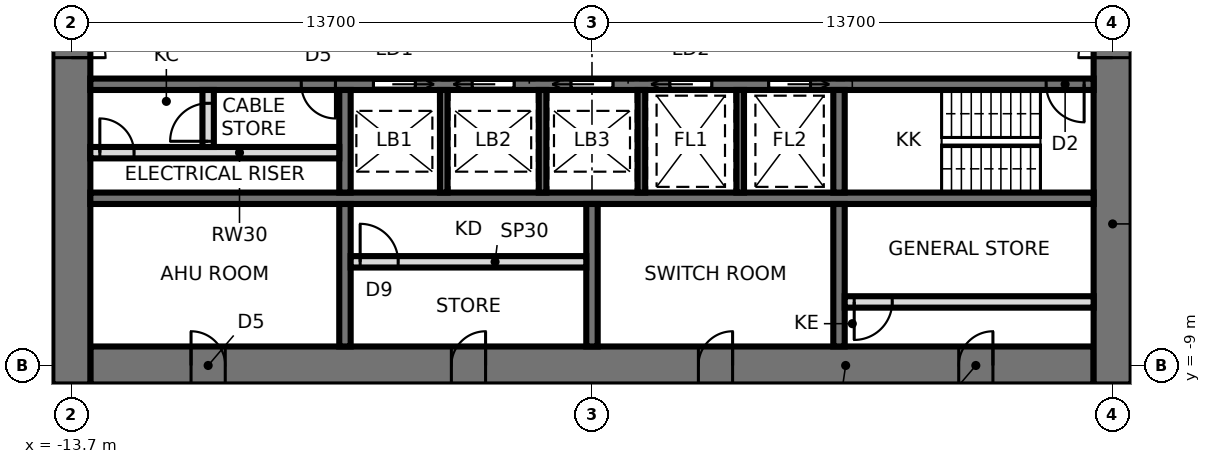
"""IFC4 building model, lengths in metres.
Left out: names, types, materials, properties, quantities, classifications, styles, units other than length and angle.
Written with IfcOpenShell. Run it as: python <this file> out.ifc"""

import sys

from ifc_helpers import new_model, si_unit, direction, frame, frame_2d, origin, place, context, subcontext, project, spatial, rectangle, extrude, element, fill, save


model = new_model("IFC4")
c1 = context("Model", 3, precision=1e-05, world=origin(), true_north=direction((0.0, 1.0)))
c2 = subcontext(c1, "Body", "Model", "MODEL_VIEW")
j1 = project(units=[si_unit("LENGTHUNIT", "METRE"), si_unit("PLANEANGLEUNIT", "RADIAN")], contexts=[c1])
p1 = place(None, origin())
s1 = spatial("IfcSite", under=j1, at=p1, CompositionType="ELEMENT")
p2 = place(p1, origin())
s2 = spatial("IfcBuilding", under=s1, at=p2, CompositionType="ELEMENT")
p3 = place(p2, frame((0.0, 0.0, 115.8)))
s3 = spatial("IfcBuildingStorey", under=s2, at=p3, CompositionType="ELEMENT", Elevation=115.8)
p4 = place(p3, frame((-13.2, -9.0, 0.0), z_axis=(0.0, 0.0, 1.0), x_axis=(1.0, 0.0, 0.0)))
e1 = element("IfcWall", 1, at=p4, inside=s3, PredefinedType="SHEAR", context=c2, shape_type="SweptSolid", body=[
    extrude(rectangle(XDim=26.4, YDim=1.0, at=frame_2d((13.2, 0.0))), origin(), (0.0, 0.0, 1.0), 3.9),
])
p5 = place(p4, frame((2.65, 0.0, 0.0)))
e2 = element("IfcOpeningElement", 2, at=p5, cuts=e1, PredefinedType="OPENING", context=c2, shape_type="SweptSolid", body=[
    extrude(rectangle(XDim=0.9, YDim=2.1, at=frame_2d((0.45, 1.05))), frame((0.0, 0.51, 0.0), z_axis=(0.0, -1.0, 0.0), x_axis=(1.0, 0.0, 0.0)), (0.0, 0.0, 1.0), 1.02),
])
p6 = place(p4, frame((9.5, 0.0, 0.0)))
e3 = element("IfcOpeningElement", 3, at=p6, cuts=e1, PredefinedType="OPENING", context=c2, shape_type="SweptSolid", body=[
    extrude(rectangle(XDim=0.9, YDim=2.1, at=frame_2d((0.45, 1.05))), frame((0.0, 0.51, 0.0), z_axis=(0.0, -1.0, 0.0), x_axis=(1.0, 0.0, 0.0)), (0.0, 0.0, 1.0), 1.02),
])
p7 = place(p4, frame((16.0, 0.0, 0.0)))
e4 = element("IfcOpeningElement", 4, at=p7, cuts=e1, PredefinedType="OPENING", context=c2, shape_type="SweptSolid", body=[
    extrude(rectangle(XDim=0.9, YDim=2.1, at=frame_2d((0.45, 1.05))), frame((0.0, 0.51, 0.0), z_axis=(0.0, -1.0, 0.0), x_axis=(1.0, 0.0, 0.0)), (0.0, 0.0, 1.0), 1.02),
])
p8 = place(p4, frame((22.85, 0.0, 0.0)))
e5 = element("IfcOpeningElement", 5, at=p8, cuts=e1, PredefinedType="OPENING", context=c2, shape_type="SweptSolid", body=[
    extrude(rectangle(XDim=0.9, YDim=2.1, at=frame_2d((0.45, 1.05))), frame((0.0, 0.51, 0.0), z_axis=(0.0, -1.0, 0.0), x_axis=(1.0, 0.0, 0.0)), (0.0, 0.0, 1.0), 1.02),
])
p9 = place(p3, frame((13.7, -9.5, 0.0), z_axis=(0.0, 0.0, 1.0), x_axis=(0.0, 1.0, 0.0)))
e6 = element("IfcWall", 6, at=p9, inside=s3, PredefinedType="SHEAR", context=c2, shape_type="SweptSolid", body=[
    extrude(rectangle(XDim=19.0, YDim=1.0, at=frame_2d((9.5, 0.0))), origin(), (0.0, 0.0, 1.0), 3.9),
])
p10 = place(p9, frame((8.6, 0.0, 0.0)))
e7 = element("IfcOpeningElement", 7, at=p10, cuts=e6, PredefinedType="OPENING", context=c2, shape_type="SweptSolid", body=[
    extrude(rectangle(XDim=1.8, YDim=2.4, at=frame_2d((0.9, 1.2))), frame((0.0, 0.51, 0.0), z_axis=(0.0, -1.0, 0.0), x_axis=(1.0, 0.0, 0.0)), (0.0, 0.0, 1.0), 1.02),
])
p11 = place(p3, frame((-13.7, 9.5, 0.0), z_axis=(0.0, 0.0, 1.0), x_axis=(0.0, -1.0, 0.0)))
e8 = element("IfcWall", 8, at=p11, inside=s3, PredefinedType="SHEAR", context=c2, shape_type="SweptSolid", body=[
    extrude(rectangle(XDim=19.0, YDim=1.0, at=frame_2d((9.5, 0.0))), origin(), (0.0, 0.0, 1.0), 3.9),
])
p12 = place(p11, frame((8.6, 0.0, 0.0)))
e9 = element("IfcOpeningElement", 9, at=p12, cuts=e8, PredefinedType="OPENING", context=c2, shape_type="SweptSolid", body=[
    extrude(rectangle(XDim=1.8, YDim=2.4, at=frame_2d((0.9, 1.2))), frame((0.0, 0.51, 0.0), z_axis=(0.0, -1.0, 0.0), x_axis=(1.0, 0.0, 0.0)), (0.0, 0.0, 1.0), 1.02),
])
p13 = place(p3, frame((-13.2, -1.6, 0.0), z_axis=(0.0, 0.0, 1.0), x_axis=(1.0, 0.0, 0.0)))
e10 = element("IfcWall", 10, at=p13, inside=s3, PredefinedType="SHEAR", context=c2, shape_type="SweptSolid", body=[
    extrude(rectangle(XDim=26.4, YDim=0.3, at=frame_2d((13.2, 0.0))), origin(), (0.0, 0.0, 1.0), 3.9),
])
p14 = place(p13, frame((25.15, 0.0, 0.0)))
e11 = element("IfcOpeningElement", 11, at=p14, cuts=e10, PredefinedType="OPENING", context=c2, shape_type="SweptSolid", body=[
    extrude(rectangle(XDim=1.0, YDim=2.1, at=frame_2d((0.5, 1.05))), frame((0.0, 0.16, 0.0), z_axis=(0.0, -1.0, 0.0), x_axis=(1.0, 0.0, 0.0)), (0.0, 0.0, 1.0), 0.32),
])
p15 = place(p13, frame((7.45, 0.0, 0.0)))
e12 = element("IfcOpeningElement", 12, at=p15, cuts=e10, PredefinedType="OPENING", context=c2, shape_type="SweptSolid", body=[
    extrude(rectangle(XDim=1.1, YDim=2.3, at=frame_2d((0.55, 1.15))), frame((0.0, 0.16, 0.0), z_axis=(0.0, -1.0, 0.0), x_axis=(1.0, 0.0, 0.0)), (0.0, 0.0, 1.0), 0.32),
])
p16 = place(p13, frame((10.05, 0.0, 0.0)))
e13 = element("IfcOpeningElement", 13, at=p16, cuts=e10, PredefinedType="OPENING", context=c2, shape_type="SweptSolid", body=[
    extrude(rectangle(XDim=1.1, YDim=2.3, at=frame_2d((0.55, 1.15))), frame((0.0, 0.16, 0.0), z_axis=(0.0, -1.0, 0.0), x_axis=(1.0, 0.0, 0.0)), (0.0, 0.0, 1.0), 0.32),
])
p17 = place(p13, frame((12.65, 0.0, 0.0)))
e14 = element("IfcOpeningElement", 14, at=p17, cuts=e10, PredefinedType="OPENING", context=c2, shape_type="SweptSolid", body=[
    extrude(rectangle(XDim=1.1, YDim=2.3, at=frame_2d((0.55, 1.15))), frame((0.0, 0.16, 0.0), z_axis=(0.0, -1.0, 0.0), x_axis=(1.0, 0.0, 0.0)), (0.0, 0.0, 1.0), 0.32),
])
p18 = place(p13, frame((15.25, 0.0, 0.0)))
e15 = element("IfcOpeningElement", 15, at=p18, cuts=e10, PredefinedType="OPENING", context=c2, shape_type="SweptSolid", body=[
    extrude(rectangle(XDim=1.1, YDim=2.3, at=frame_2d((0.55, 1.15))), frame((0.0, 0.16, 0.0), z_axis=(0.0, -1.0, 0.0), x_axis=(1.0, 0.0, 0.0)), (0.0, 0.0, 1.0), 0.32),
])
p19 = place(p13, frame((17.85, 0.0, 0.0)))
e16 = element("IfcOpeningElement", 16, at=p19, cuts=e10, PredefinedType="OPENING", context=c2, shape_type="SweptSolid", body=[
    extrude(rectangle(XDim=1.1, YDim=2.3, at=frame_2d((0.55, 1.15))), frame((0.0, 0.16, 0.0), z_axis=(0.0, -1.0, 0.0), x_axis=(1.0, 0.0, 0.0)), (0.0, 0.0, 1.0), 0.32),
])
p20 = place(p13, frame((5.55, 0.0, 0.0)))
e17 = element("IfcOpeningElement", 17, at=p20, cuts=e10, PredefinedType="OPENING", context=c2, shape_type="SweptSolid", body=[
    extrude(rectangle(XDim=0.9, YDim=2.1, at=frame_2d((0.45, 1.05))), frame((0.0, 0.16, 0.0), z_axis=(0.0, -1.0, 0.0), x_axis=(1.0, 0.0, 0.0)), (0.0, 0.0, 1.0), 0.32),
])
p21 = place(p3, frame((-13.2, -4.6, 0.0), z_axis=(0.0, 0.0, 1.0), x_axis=(1.0, 0.0, 0.0)))
e18 = element("IfcWall", 18, at=p21, inside=s3, PredefinedType="SHEAR", context=c2, shape_type="SweptSolid", body=[
    extrude(rectangle(XDim=26.4, YDim=0.3, at=frame_2d((13.2, 0.0))), origin(), (0.0, 0.0, 1.0), 3.9),
])
p22 = place(p3, frame((-6.5, -1.75, 0.0), z_axis=(0.0, 0.0, 1.0), x_axis=(0.0, -1.0, 0.0)))
e19 = element("IfcWall", 19, at=p22, inside=s3, PredefinedType="SHEAR", context=c2, shape_type="SweptSolid", body=[
    extrude(rectangle(XDim=2.7, YDim=0.3, at=frame_2d((1.35, 0.0))), origin(), (0.0, 0.0, 1.0), 3.9),
])
p23 = place(p3, frame((-6.5, -4.75, 0.0), z_axis=(0.0, 0.0, 1.0), x_axis=(0.0, -1.0, 0.0)))
e20 = element("IfcWall", 20, at=p23, inside=s3, PredefinedType="SHEAR", context=c2, shape_type="SweptSolid", body=[
    extrude(rectangle(XDim=3.75, YDim=0.3, at=frame_2d((1.875, 0.0))), origin(), (0.0, 0.0, 1.0), 3.9),
])
p24 = place(p3, frame((6.5, -1.75, 0.0), z_axis=(0.0, 0.0, 1.0), x_axis=(0.0, -1.0, 0.0)))
e21 = element("IfcWall", 21, at=p24, inside=s3, PredefinedType="SHEAR", context=c2, shape_type="SweptSolid", body=[
    extrude(rectangle(XDim=2.7, YDim=0.3, at=frame_2d((1.35, 0.0))), origin(), (0.0, 0.0, 1.0), 3.9),
])
p25 = place(p3, frame((6.5, -4.75, 0.0), z_axis=(0.0, 0.0, 1.0), x_axis=(0.0, -1.0, 0.0)))
e22 = element("IfcWall", 22, at=p25, inside=s3, PredefinedType="SHEAR", context=c2, shape_type="SweptSolid", body=[
    extrude(rectangle(XDim=3.75, YDim=0.3, at=frame_2d((1.875, 0.0))), origin(), (0.0, 0.0, 1.0), 3.9),
])
for number, where, z_axis, x_axis in (
    (23, (-3.9, -1.75, 0.0), (0.0, 0.0, 1.0), (0.0, -1.0, 0.0)),
    (24, (-1.3, -1.75, 0.0), (0.0, 0.0, 1.0), (0.0, -1.0, 0.0)),
    (25, (1.3, -1.75, 0.0), (0.0, 0.0, 1.0), (0.0, -1.0, 0.0)),
    (26, (3.9, -1.75, 0.0), (0.0, 0.0, 1.0), (0.0, -1.0, 0.0)),
):
    element("IfcWall", number, at=place(p3, frame(where, z_axis=z_axis, x_axis=x_axis)), inside=s3, PredefinedType="SHEAR", context=c2, shape_type="SweptSolid", body=[
        extrude(rectangle(XDim=2.7, YDim=0.2, at=frame_2d((1.35, 0.0))), origin(), (0.0, 0.0, 1.0), 3.9),
    ])
p26 = place(p3, frame((0.0, -4.75, 0.0), z_axis=(0.0, 0.0, 1.0), x_axis=(0.0, -1.0, 0.0)))
e27 = element("IfcWall", 27, at=p26, inside=s3, PredefinedType="SHEAR", context=c2, shape_type="SweptSolid", body=[
    extrude(rectangle(XDim=3.75, YDim=0.3, at=frame_2d((1.875, 0.0))), origin(), (0.0, 0.0, 1.0), 3.9),
])
p27 = place(p3, frame((-6.35, -6.272, 0.0), z_axis=(0.0, 0.0, 1.0), x_axis=(1.0, 0.0, 0.0)))
e28 = element("IfcWall", 28, at=p27, inside=s3, PredefinedType="PARTITIONING", context=c2, shape_type="SweptSolid", body=[
    extrude(rectangle(XDim=6.2, YDim=0.3, at=frame_2d((3.1, 0.0))), origin(), (0.0, 0.0, 1.0), 3.74),
])
p28 = place(p27, frame((0.25, 0.0, 0.0)))
e29 = element("IfcOpeningElement", 29, at=p28, cuts=e28, PredefinedType="OPENING", context=c2, shape_type="SweptSolid", body=[
    extrude(rectangle(XDim=1.0, YDim=2.4, at=frame_2d((0.5, 1.2))), frame((0.0, 0.16, 0.0), z_axis=(0.0, -1.0, 0.0), x_axis=(1.0, 0.0, 0.0)), (0.0, 0.0, 1.0), 0.32),
])
p29 = place(p3, frame((6.65, -7.328, 0.0), z_axis=(0.0, 0.0, 1.0), x_axis=(1.0, 0.0, 0.0)))
e30 = element("IfcWall", 30, at=p29, inside=s3, PredefinedType="PARTITIONING", context=c2, shape_type="SweptSolid", body=[
    extrude(rectangle(XDim=6.55, YDim=0.3, at=frame_2d((3.275, 0.0))), origin(), (0.0, 0.0, 1.0), 3.74),
])
p30 = place(p29, frame((0.25, 0.0, 0.0)))
e31 = element("IfcOpeningElement", 31, at=p30, cuts=e30, PredefinedType="OPENING", context=c2, shape_type="SweptSolid", body=[
    extrude(rectangle(XDim=1.0, YDim=2.4, at=frame_2d((0.5, 1.2))), frame((0.0, 0.16, 0.0), z_axis=(0.0, -1.0, 0.0), x_axis=(1.0, 0.0, 0.0)), (0.0, 0.0, 1.0), 0.32),
])
p31 = place(p3, frame((-13.2, -3.4, 0.0), z_axis=(0.0, 0.0, 1.0), x_axis=(1.0, 0.0, 0.0)))
e32 = element("IfcWall", 32, at=p31, inside=s3, PredefinedType="SOLIDWALL", context=c2, shape_type="SweptSolid", body=[
    extrude(rectangle(XDim=6.55, YDim=0.3, at=frame_2d((3.275, 0.0))), origin(), (0.0, 0.0, 1.0), 3.74),
])
p32 = place(p31, frame((0.25, 0.0, 0.0)))
e33 = element("IfcOpeningElement", 33, at=p32, cuts=e32, PredefinedType="OPENING", context=c2, shape_type="SweptSolid", body=[
    extrude(rectangle(XDim=0.9, YDim=2.1, at=frame_2d((0.45, 1.05))), frame((0.0, 0.16, 0.0), z_axis=(0.0, -1.0, 0.0), x_axis=(1.0, 0.0, 0.0)), (0.0, 0.0, 1.0), 0.32),
])
p33 = place(p3, frame((-10.1, -3.25, 0.0), z_axis=(0.0, 0.0, 1.0), x_axis=(0.0, 1.0, 0.0)))
e34 = element("IfcWall", 34, at=p33, inside=s3, PredefinedType="PARTITIONING", context=c2, shape_type="SweptSolid", body=[
    extrude(rectangle(XDim=1.5, YDim=0.3, at=frame_2d((0.75, 0.0))), origin(), (0.0, 0.0, 1.0), 3.74),
])
p34 = place(p33, frame((0.15, 0.0, 0.0)))
e35 = element("IfcOpeningElement", 35, at=p34, cuts=e34, PredefinedType="OPENING", context=c2, shape_type="SweptSolid", body=[
    extrude(rectangle(XDim=1.0, YDim=2.4, at=frame_2d((0.5, 1.2))), frame((0.0, 0.16, 0.0), z_axis=(0.0, -1.0, 0.0), x_axis=(1.0, 0.0, 0.0)), (0.0, 0.0, 1.0), 0.32),
])
p35 = place(p12, origin())
e36 = element("IfcDoor", 36, at=p35, inside=s3, OperationType="DOUBLE_DOOR_SINGLE_SWING", PredefinedType="DOOR", context=c2, shape_type="SweptSolid", body=[
    extrude(rectangle(XDim=1.72, YDim=2.36, at=frame_2d((0.9, 1.18))), frame((0.0, 0.025, 0.0), z_axis=(0.0, -1.0, 0.0), x_axis=(1.0, 0.0, 0.0)), (0.0, 0.0, 1.0), 0.05),
    extrude(rectangle(XDim=0.04, YDim=2.4, at=frame_2d((0.02, 1.2))), frame((0.0, 0.25, 0.0), z_axis=(0.0, -1.0, 0.0), x_axis=(1.0, 0.0, 0.0)), (0.0, 0.0, 1.0), 0.5),
    extrude(rectangle(XDim=0.04, YDim=2.4, at=frame_2d((1.78, 1.2))), frame((0.0, 0.25, 0.0), z_axis=(0.0, -1.0, 0.0), x_axis=(1.0, 0.0, 0.0)), (0.0, 0.0, 1.0), 0.5),
    extrude(rectangle(XDim=1.72, YDim=0.04, at=frame_2d((0.9, 2.38))), frame((0.0, 0.25, 0.0), z_axis=(0.0, -1.0, 0.0), x_axis=(1.0, 0.0, 0.0)), (0.0, 0.0, 1.0), 0.5),
])
fill(e9, e36)
p36 = place(p10, origin())
e37 = element("IfcDoor", 37, at=p36, inside=s3, OperationType="DOUBLE_DOOR_SINGLE_SWING", PredefinedType="DOOR", context=c2, shape_type="SweptSolid", body=[
    extrude(rectangle(XDim=1.72, YDim=2.36, at=frame_2d((0.9, 1.18))), frame((0.0, 0.025, 0.0), z_axis=(0.0, -1.0, 0.0), x_axis=(1.0, 0.0, 0.0)), (0.0, 0.0, 1.0), 0.05),
    extrude(rectangle(XDim=0.04, YDim=2.4, at=frame_2d((0.02, 1.2))), frame((0.0, 0.25, 0.0), z_axis=(0.0, -1.0, 0.0), x_axis=(1.0, 0.0, 0.0)), (0.0, 0.0, 1.0), 0.5),
    extrude(rectangle(XDim=0.04, YDim=2.4, at=frame_2d((1.78, 1.2))), frame((0.0, 0.25, 0.0), z_axis=(0.0, -1.0, 0.0), x_axis=(1.0, 0.0, 0.0)), (0.0, 0.0, 1.0), 0.5),
    extrude(rectangle(XDim=1.72, YDim=0.04, at=frame_2d((0.9, 2.38))), frame((0.0, 0.25, 0.0), z_axis=(0.0, -1.0, 0.0), x_axis=(1.0, 0.0, 0.0)), (0.0, 0.0, 1.0), 0.5),
])
fill(e7, e37)
p37 = place(p14, frame((1.0, 0.0, 0.0), z_axis=(0.0, 0.0, 1.0), x_axis=(-1.0, 0.0, 0.0)))
e38 = element("IfcDoor", 38, at=p37, inside=s3, OperationType="SINGLE_SWING_LEFT", PredefinedType="DOOR", context=c2, shape_type="SweptSolid", body=[
    extrude(rectangle(XDim=1.0, YDim=2.1, at=frame_2d((0.5, 1.05))), frame((0.0, 0.025, 0.0), z_axis=(0.0, -1.0, 0.0), x_axis=(1.0, 0.0, 0.0)), (0.0, 0.0, 1.0), 0.05),
])
fill(e11, e38)
p38 = place(p15, frame((1.1, 0.0, 0.0), z_axis=(0.0, 0.0, 1.0), x_axis=(-1.0, 0.0, 0.0)))
e39 = element("IfcDoor", 39, at=p38, inside=s3, OperationType="SLIDING_TO_LEFT", PredefinedType="DOOR", context=c2, shape_type="SweptSolid", body=[
    extrude(rectangle(XDim=1.1, YDim=2.3, at=frame_2d((0.55, 1.15))), frame((0.0, 0.025, 0.0), z_axis=(0.0, -1.0, 0.0), x_axis=(1.0, 0.0, 0.0)), (0.0, 0.0, 1.0), 0.05),
])
fill(e12, e39)
p39 = place(p16, frame((1.1, 0.0, 0.0), z_axis=(0.0, 0.0, 1.0), x_axis=(-1.0, 0.0, 0.0)))
e40 = element("IfcDoor", 40, at=p39, inside=s3, OperationType="SLIDING_TO_RIGHT", PredefinedType="DOOR", context=c2, shape_type="SweptSolid", body=[
    extrude(rectangle(XDim=1.1, YDim=2.3, at=frame_2d((0.55, 1.15))), frame((0.0, 0.025, 0.0), z_axis=(0.0, -1.0, 0.0), x_axis=(1.0, 0.0, 0.0)), (0.0, 0.0, 1.0), 0.05),
])
fill(e13, e40)
p40 = place(p17, frame((1.1, 0.0, 0.0), z_axis=(0.0, 0.0, 1.0), x_axis=(-1.0, 0.0, 0.0)))
e41 = element("IfcDoor", 41, at=p40, inside=s3, OperationType="SLIDING_TO_RIGHT", PredefinedType="DOOR", context=c2, shape_type="SweptSolid", body=[
    extrude(rectangle(XDim=1.1, YDim=2.3, at=frame_2d((0.55, 1.15))), frame((0.0, 0.025, 0.0), z_axis=(0.0, -1.0, 0.0), x_axis=(1.0, 0.0, 0.0)), (0.0, 0.0, 1.0), 0.05),
])
fill(e14, e41)
p41 = place(p18, frame((1.1, 0.0, 0.0), z_axis=(0.0, 0.0, 1.0), x_axis=(-1.0, 0.0, 0.0)))
e42 = element("IfcDoor", 42, at=p41, inside=s3, OperationType="SLIDING_TO_RIGHT", PredefinedType="DOOR", context=c2, shape_type="SweptSolid", body=[
    extrude(rectangle(XDim=1.1, YDim=2.3, at=frame_2d((0.55, 1.15))), frame((0.0, 0.025, 0.0), z_axis=(0.0, -1.0, 0.0), x_axis=(1.0, 0.0, 0.0)), (0.0, 0.0, 1.0), 0.05),
])
fill(e15, e42)
p42 = place(p19, frame((1.1, 0.0, 0.0), z_axis=(0.0, 0.0, 1.0), x_axis=(-1.0, 0.0, 0.0)))
e43 = element("IfcDoor", 43, at=p42, inside=s3, OperationType="SLIDING_TO_LEFT", PredefinedType="DOOR", context=c2, shape_type="SweptSolid", body=[
    extrude(rectangle(XDim=1.1, YDim=2.3, at=frame_2d((0.55, 1.15))), frame((0.0, 0.025, 0.0), z_axis=(0.0, -1.0, 0.0), x_axis=(1.0, 0.0, 0.0)), (0.0, 0.0, 1.0), 0.05),
])
fill(e16, e43)
p43 = place(p20, frame((0.9, 0.0, 0.0), z_axis=(0.0, 0.0, 1.0), x_axis=(-1.0, 0.0, 0.0)))
e44 = element("IfcDoor", 44, at=p43, inside=s3, OperationType="SINGLE_SWING_LEFT", PredefinedType="DOOR", context=c2, shape_type="SweptSolid", body=[
    extrude(rectangle(XDim=0.9, YDim=2.1, at=frame_2d((0.45, 1.05))), frame((0.0, 0.025, 0.0), z_axis=(0.0, -1.0, 0.0), x_axis=(1.0, 0.0, 0.0)), (0.0, 0.0, 1.0), 0.05),
])
fill(e17, e44)
p44 = place(p5, origin())
e45 = element("IfcDoor", 45, at=p44, inside=s3, OperationType="SINGLE_SWING_LEFT", PredefinedType="DOOR", context=c2, shape_type="SweptSolid", body=[
    extrude(rectangle(XDim=0.82, YDim=2.06, at=frame_2d((0.45, 1.03))), frame((0.0, 0.025, 0.0), z_axis=(0.0, -1.0, 0.0), x_axis=(1.0, 0.0, 0.0)), (0.0, 0.0, 1.0), 0.05),
    extrude(rectangle(XDim=0.04, YDim=2.1, at=frame_2d((0.02, 1.05))), frame((0.0, 0.25, 0.0), z_axis=(0.0, -1.0, 0.0), x_axis=(1.0, 0.0, 0.0)), (0.0, 0.0, 1.0), 0.5),
    extrude(rectangle(XDim=0.04, YDim=2.1, at=frame_2d((0.88, 1.05))), frame((0.0, 0.25, 0.0), z_axis=(0.0, -1.0, 0.0), x_axis=(1.0, 0.0, 0.0)), (0.0, 0.0, 1.0), 0.5),
    extrude(rectangle(XDim=0.82, YDim=0.04, at=frame_2d((0.45, 2.08))), frame((0.0, 0.25, 0.0), z_axis=(0.0, -1.0, 0.0), x_axis=(1.0, 0.0, 0.0)), (0.0, 0.0, 1.0), 0.5),
])
fill(e2, e45)
p45 = place(p6, origin())
e46 = element("IfcDoor", 46, at=p45, inside=s3, OperationType="SINGLE_SWING_RIGHT", PredefinedType="DOOR", context=c2, shape_type="SweptSolid", body=[
    extrude(rectangle(XDim=0.82, YDim=2.06, at=frame_2d((0.45, 1.03))), frame((0.0, 0.025, 0.0), z_axis=(0.0, -1.0, 0.0), x_axis=(1.0, 0.0, 0.0)), (0.0, 0.0, 1.0), 0.05),
    extrude(rectangle(XDim=0.04, YDim=2.1, at=frame_2d((0.02, 1.05))), frame((0.0, 0.25, 0.0), z_axis=(0.0, -1.0, 0.0), x_axis=(1.0, 0.0, 0.0)), (0.0, 0.0, 1.0), 0.5),
    extrude(rectangle(XDim=0.04, YDim=2.1, at=frame_2d((0.88, 1.05))), frame((0.0, 0.25, 0.0), z_axis=(0.0, -1.0, 0.0), x_axis=(1.0, 0.0, 0.0)), (0.0, 0.0, 1.0), 0.5),
    extrude(rectangle(XDim=0.82, YDim=0.04, at=frame_2d((0.45, 2.08))), frame((0.0, 0.25, 0.0), z_axis=(0.0, -1.0, 0.0), x_axis=(1.0, 0.0, 0.0)), (0.0, 0.0, 1.0), 0.5),
])
fill(e3, e46)
p46 = place(p7, origin())
e47 = element("IfcDoor", 47, at=p46, inside=s3, OperationType="SINGLE_SWING_RIGHT", PredefinedType="DOOR", context=c2, shape_type="SweptSolid", body=[
    extrude(rectangle(XDim=0.82, YDim=2.06, at=frame_2d((0.45, 1.03))), frame((0.0, 0.025, 0.0), z_axis=(0.0, -1.0, 0.0), x_axis=(1.0, 0.0, 0.0)), (0.0, 0.0, 1.0), 0.05),
    extrude(rectangle(XDim=0.04, YDim=2.1, at=frame_2d((0.02, 1.05))), frame((0.0, 0.25, 0.0), z_axis=(0.0, -1.0, 0.0), x_axis=(1.0, 0.0, 0.0)), (0.0, 0.0, 1.0), 0.5),
    extrude(rectangle(XDim=0.04, YDim=2.1, at=frame_2d((0.88, 1.05))), frame((0.0, 0.25, 0.0), z_axis=(0.0, -1.0, 0.0), x_axis=(1.0, 0.0, 0.0)), (0.0, 0.0, 1.0), 0.5),
    extrude(rectangle(XDim=0.82, YDim=0.04, at=frame_2d((0.45, 2.08))), frame((0.0, 0.25, 0.0), z_axis=(0.0, -1.0, 0.0), x_axis=(1.0, 0.0, 0.0)), (0.0, 0.0, 1.0), 0.5),
])
fill(e4, e47)
p47 = place(p8, origin())
e48 = element("IfcDoor", 48, at=p47, inside=s3, OperationType="SINGLE_SWING_RIGHT", PredefinedType="DOOR", context=c2, shape_type="SweptSolid", body=[
    extrude(rectangle(XDim=0.82, YDim=2.06, at=frame_2d((0.45, 1.03))), frame((0.0, 0.025, 0.0), z_axis=(0.0, -1.0, 0.0), x_axis=(1.0, 0.0, 0.0)), (0.0, 0.0, 1.0), 0.05),
    extrude(rectangle(XDim=0.04, YDim=2.1, at=frame_2d((0.02, 1.05))), frame((0.0, 0.25, 0.0), z_axis=(0.0, -1.0, 0.0), x_axis=(1.0, 0.0, 0.0)), (0.0, 0.0, 1.0), 0.5),
    extrude(rectangle(XDim=0.04, YDim=2.1, at=frame_2d((0.88, 1.05))), frame((0.0, 0.25, 0.0), z_axis=(0.0, -1.0, 0.0), x_axis=(1.0, 0.0, 0.0)), (0.0, 0.0, 1.0), 0.5),
    extrude(rectangle(XDim=0.82, YDim=0.04, at=frame_2d((0.45, 2.08))), frame((0.0, 0.25, 0.0), z_axis=(0.0, -1.0, 0.0), x_axis=(1.0, 0.0, 0.0)), (0.0, 0.0, 1.0), 0.5),
])
fill(e5, e48)
p48 = place(p28, origin())
e49 = element("IfcDoor", 49, at=p48, inside=s3, OperationType="SINGLE_SWING_LEFT", PredefinedType="DOOR", context=c2, shape_type="SweptSolid", body=[
    extrude(rectangle(XDim=1.0, YDim=2.4, at=frame_2d((0.5, 1.2))), frame((0.0, 0.025, 0.0), z_axis=(0.0, -1.0, 0.0), x_axis=(1.0, 0.0, 0.0)), (0.0, 0.0, 1.0), 0.05),
])
fill(e29, e49)
p49 = place(p30, frame((1.0, 0.0, 0.0), z_axis=(0.0, 0.0, 1.0), x_axis=(-1.0, 0.0, 0.0)))
e50 = element("IfcDoor", 50, at=p49, inside=s3, OperationType="SINGLE_SWING_RIGHT", PredefinedType="DOOR", context=c2, shape_type="SweptSolid", body=[
    extrude(rectangle(XDim=1.0, YDim=2.4, at=frame_2d((0.5, 1.2))), frame((0.0, 0.025, 0.0), z_axis=(0.0, -1.0, 0.0), x_axis=(1.0, 0.0, 0.0)), (0.0, 0.0, 1.0), 0.05),
])
fill(e31, e50)
p50 = place(p32, origin())
e51 = element("IfcDoor", 51, at=p50, inside=s3, OperationType="SINGLE_SWING_LEFT", PredefinedType="DOOR", context=c2, shape_type="SweptSolid", body=[
    extrude(rectangle(XDim=0.9, YDim=2.1, at=frame_2d((0.45, 1.05))), frame((0.0, 0.025, 0.0), z_axis=(0.0, -1.0, 0.0), x_axis=(1.0, 0.0, 0.0)), (0.0, 0.0, 1.0), 0.05),
])
fill(e33, e51)
p51 = place(p34, origin())
e52 = element("IfcDoor", 52, at=p51, inside=s3, OperationType="SINGLE_SWING_LEFT", PredefinedType="DOOR", context=c2, shape_type="SweptSolid", body=[
    extrude(rectangle(XDim=1.0, YDim=2.4, at=frame_2d((0.5, 1.2))), frame((0.0, 0.025, 0.0), z_axis=(0.0, -1.0, 0.0), x_axis=(1.0, 0.0, 0.0)), (0.0, 0.0, 1.0), 0.05),
])
fill(e35, e52)
save(model, sys.argv[1])
